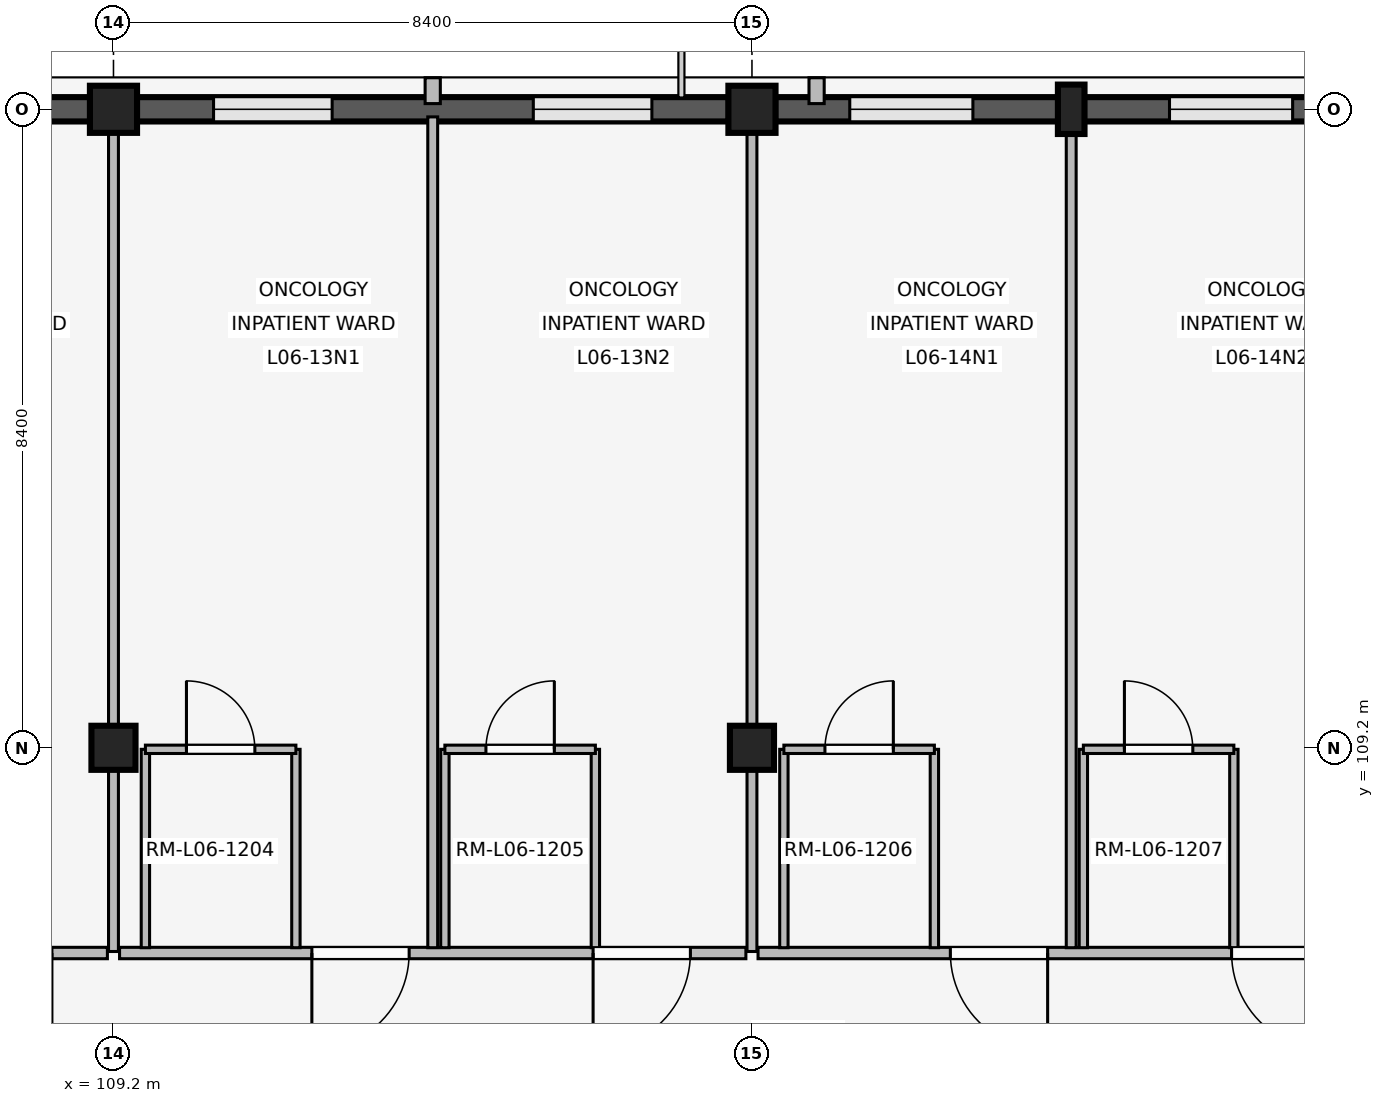
"""IFC4 building model, lengths in metres.
Left out: names, types, materials, properties, quantities, classifications, styles, units other than length and angle.
Written with IfcOpenShell. Run it as: python <this file> out.ifc"""

import sys

from ifc_helpers import new_model, si_unit, direction, frame, frame_2d, origin, origin_2d, place, context, subcontext, project, spatial, rectangle, extrude, element, fill, save


model = new_model("IFC4")
c1 = context("Model", 3, precision=1e-05, world=origin(), true_north=direction((0.0, 1.0)))
c2 = subcontext(c1, "Body", "Model", "MODEL_VIEW")
j1 = project(units=[si_unit("LENGTHUNIT", "METRE"), si_unit("PLANEANGLEUNIT", "RADIAN")], contexts=[c1])
p1 = place(None, origin())
s1 = spatial("IfcSite", under=j1, at=p1, CompositionType="ELEMENT")
p2 = place(p1, origin())
s2 = spatial("IfcBuilding", under=s1, at=p2, CompositionType="ELEMENT")
p3 = place(p2, frame((0.0, 0.0, 24.6)))
s3 = spatial("IfcBuildingStorey", under=s2, at=p3, CompositionType="ELEMENT", Elevation=24.6)
p4 = place(p3, frame((109.2, 109.2, 0.0), z_axis=(0.0, 0.0, 1.0), x_axis=(1.0, 0.0, 0.0)))
e1 = element("IfcColumn", 1, at=p4, inside=s3, PredefinedType="COLUMN", context=c2, shape_type="SweptSolid", body=[
    extrude(rectangle(XDim=0.58, YDim=0.58, at=origin_2d()), origin(), (0.0, 0.0, 1.0), 4.2),
])
p5 = place(p3, frame((109.2, 117.6, 0.0), z_axis=(0.0, 0.0, 1.0), x_axis=(1.0, 0.0, 0.0)))
e2 = element("IfcColumn", 2, at=p5, inside=s3, PredefinedType="COLUMN", context=c2, shape_type="SweptSolid", body=[
    extrude(rectangle(XDim=0.62, YDim=0.62, at=origin_2d()), origin(), (0.0, 0.0, 1.0), 4.2),
])
p6 = place(p3, frame((117.6, 109.2, 0.0), z_axis=(0.0, 0.0, 1.0), x_axis=(1.0, 0.0, 0.0)))
e3 = element("IfcColumn", 3, at=p6, inside=s3, PredefinedType="COLUMN", context=c2, shape_type="SweptSolid", body=[
    extrude(rectangle(XDim=0.58, YDim=0.58, at=origin_2d()), origin(), (0.0, 0.0, 1.0), 4.2),
])
p7 = place(p3, frame((117.6, 117.6, 0.0), z_axis=(0.0, 0.0, 1.0), x_axis=(1.0, 0.0, 0.0)))
e4 = element("IfcColumn", 4, at=p7, inside=s3, PredefinedType="COLUMN", context=c2, shape_type="SweptSolid", body=[
    extrude(rectangle(XDim=0.62, YDim=0.62, at=origin_2d()), origin(), (0.0, 0.0, 1.0), 4.2),
])
p8 = place(p3, frame((121.8, 117.6, 0.0), z_axis=(0.0, 0.0, 1.0), x_axis=(1.0, 0.0, 0.0)))
e5 = element("IfcColumn", 5, at=p8, inside=s3, PredefinedType="PILASTER", context=c2, shape_type="SweptSolid", body=[
    extrude(rectangle(XDim=0.35, YDim=0.65, at=origin_2d()), origin(), (0.0, 0.0, 1.0), 4.2),
])
p9 = place(p3, frame((101.105, 117.6, 0.0), z_axis=(0.0, 0.0, 1.0), x_axis=(1.0, 0.0, 0.0)))
e6 = element("IfcWall", 6, at=p9, inside=s3, PredefinedType="SOLIDWALL", context=c2, shape_type="SweptSolid", body=[
    extrude(rectangle(XDim=7.79, YDim=0.32, at=frame_2d((3.895, 0.0))), origin(), (0.0, 0.0, 1.0), 3.34),
])
p10 = place(p9, frame((1.102, 0.0, 0.85)))
e7 = element("IfcOpeningElement", 7, at=p10, cuts=e6, PredefinedType="OPENING", context=c2, shape_type="SweptSolid", body=[
    extrude(rectangle(XDim=1.38, YDim=1.5, at=frame_2d((0.69, 0.75))), frame((0.0, 0.17, 0.0), z_axis=(0.0, -1.0, 0.0), x_axis=(1.0, 0.0, 0.0)), (0.0, 0.0, 1.0), 0.34),
])
p11 = place(p9, frame((5.308, 0.0, 0.85)))
e8 = element("IfcOpeningElement", 8, at=p11, cuts=e6, PredefinedType="OPENING", context=c2, shape_type="SweptSolid", body=[
    extrude(rectangle(XDim=1.38, YDim=1.5, at=frame_2d((0.69, 0.75))), frame((0.0, 0.17, 0.0), z_axis=(0.0, -1.0, 0.0), x_axis=(1.0, 0.0, 0.0)), (0.0, 0.0, 1.0), 0.34),
])
p12 = place(p3, frame((109.505, 117.6, 0.0), z_axis=(0.0, 0.0, 1.0), x_axis=(1.0, 0.0, 0.0)))
e9 = element("IfcWall", 9, at=p12, inside=s3, PredefinedType="SOLIDWALL", context=c2, shape_type="SweptSolid", body=[
    extrude(rectangle(XDim=7.79, YDim=0.32, at=frame_2d((3.895, 0.0))), origin(), (0.0, 0.0, 1.0), 3.34),
])
p13 = place(p12, frame((1.012, 0.0, 0.85)))
e10 = element("IfcOpeningElement", 10, at=p13, cuts=e9, PredefinedType="OPENING", context=c2, shape_type="SweptSolid", body=[
    extrude(rectangle(XDim=1.56, YDim=1.7, at=frame_2d((0.78, 0.85))), frame((0.0, 0.17, 0.0), z_axis=(0.0, -1.0, 0.0), x_axis=(1.0, 0.0, 0.0)), (0.0, 0.0, 1.0), 0.34),
])
p14 = place(p12, frame((5.218, 0.0, 0.85)))
e11 = element("IfcOpeningElement", 11, at=p14, cuts=e9, PredefinedType="OPENING", context=c2, shape_type="SweptSolid", body=[
    extrude(rectangle(XDim=1.56, YDim=1.7, at=frame_2d((0.78, 0.85))), frame((0.0, 0.17, 0.0), z_axis=(0.0, -1.0, 0.0), x_axis=(1.0, 0.0, 0.0)), (0.0, 0.0, 1.0), 0.34),
])
p15 = place(p3, frame((113.4, 117.675, 0.0), z_axis=(0.0, 0.0, 1.0), x_axis=(0.0, 1.0, 0.0)))
e12 = element("IfcWall", 12, at=p15, inside=s3, PredefinedType="ELEMENTEDWALL", context=c2, shape_type="SweptSolid", body=[
    extrude(rectangle(XDim=0.34, YDim=0.2, at=frame_2d((0.17, 0.0))), origin(), (0.0, 0.0, 1.0), 3.32),
])
p16 = place(p3, frame((117.905, 117.6, 0.0), z_axis=(0.0, 0.0, 1.0), x_axis=(1.0, 0.0, 0.0)))
e13 = element("IfcWall", 13, at=p16, inside=s3, PredefinedType="SOLIDWALL", context=c2, shape_type="SweptSolid", body=[
    extrude(rectangle(XDim=7.79, YDim=0.32, at=frame_2d((3.895, 0.0))), origin(), (0.0, 0.0, 1.0), 3.34),
])
p17 = place(p16, frame((0.982, 0.0, 0.85)))
e14 = element("IfcOpeningElement", 14, at=p17, cuts=e13, PredefinedType="OPENING", context=c2, shape_type="SweptSolid", body=[
    extrude(rectangle(XDim=1.62, YDim=1.8, at=frame_2d((0.81, 0.9))), frame((0.0, 0.17, 0.0), z_axis=(0.0, -1.0, 0.0), x_axis=(1.0, 0.0, 0.0)), (0.0, 0.0, 1.0), 0.34),
])
p18 = place(p16, frame((5.188, 0.0, 0.85)))
e15 = element("IfcOpeningElement", 15, at=p18, cuts=e13, PredefinedType="OPENING", context=c2, shape_type="SweptSolid", body=[
    extrude(rectangle(XDim=1.62, YDim=1.8, at=frame_2d((0.81, 0.9))), frame((0.0, 0.17, 0.0), z_axis=(0.0, -1.0, 0.0), x_axis=(1.0, 0.0, 0.0)), (0.0, 0.0, 1.0), 0.34),
])
p19 = place(p3, frame((118.45, 117.675, 0.0), z_axis=(0.0, 0.0, 1.0), x_axis=(0.0, 1.0, 0.0)))
e16 = element("IfcWall", 16, at=p19, inside=s3, PredefinedType="ELEMENTEDWALL", context=c2, shape_type="SweptSolid", body=[
    extrude(rectangle(XDim=0.34, YDim=0.2, at=frame_2d((0.17, 0.0))), origin(), (0.0, 0.0, 1.0), 3.32),
])
p20 = place(p3, frame((109.12, 106.5, 0.0), z_axis=(0.0, 0.0, 1.0), x_axis=(-1.0, 0.0, 0.0)))
e17 = element("IfcWall", 17, at=p20, inside=s3, PredefinedType="PARTITIONING", context=c2, shape_type="SweptSolid", body=[
    extrude(rectangle(XDim=8.24, YDim=0.15, at=frame_2d((4.12, 0.0))), origin(), (0.0, 0.0, 1.0), 3.32),
])
p21 = place(p20, frame((0.73, 0.0, 0.0)))
e18 = element("IfcOpeningElement", 18, at=p21, cuts=e17, PredefinedType="OPENING", context=c2, shape_type="SweptSolid", body=[
    extrude(rectangle(XDim=1.28, YDim=2.2, at=frame_2d((0.64, 1.1))), frame((0.0, 0.085, 0.0), z_axis=(0.0, -1.0, 0.0), x_axis=(1.0, 0.0, 0.0)), (0.0, 0.0, 1.0), 0.17),
])
p22 = place(p20, frame((4.43, 0.0, 0.0)))
e19 = element("IfcOpeningElement", 19, at=p22, cuts=e17, PredefinedType="OPENING", context=c2, shape_type="SweptSolid", body=[
    extrude(rectangle(XDim=1.28, YDim=2.2, at=frame_2d((0.64, 1.1))), frame((0.0, 0.085, 0.0), z_axis=(0.0, -1.0, 0.0), x_axis=(1.0, 0.0, 0.0)), (0.0, 0.0, 1.0), 0.17),
])
p23 = place(p3, frame((109.2, 106.52, 0.0), z_axis=(0.0, 0.0, 1.0), x_axis=(0.0, 1.0, 0.0)))
e20 = element("IfcWall", 20, at=p23, inside=s3, PredefinedType="PARTITIONING", context=c2, shape_type="SweptSolid", body=[
    extrude(rectangle(XDim=10.94, YDim=0.13, at=frame_2d((5.47, 0.0))), origin(), (0.0, 0.0, 1.0), 3.32),
])
p24 = place(p3, frame((117.52, 106.5, 0.0), z_axis=(0.0, 0.0, 1.0), x_axis=(-1.0, 0.0, 0.0)))
e21 = element("IfcWall", 21, at=p24, inside=s3, PredefinedType="PARTITIONING", context=c2, shape_type="SweptSolid", body=[
    extrude(rectangle(XDim=8.24, YDim=0.15, at=frame_2d((4.12, 0.0))), origin(), (0.0, 0.0, 1.0), 3.32),
])
p25 = place(p24, frame((0.73, 0.0, 0.0)))
e22 = element("IfcOpeningElement", 22, at=p25, cuts=e21, PredefinedType="OPENING", context=c2, shape_type="SweptSolid", body=[
    extrude(rectangle(XDim=1.28, YDim=2.2, at=frame_2d((0.64, 1.1))), frame((0.0, 0.085, 0.0), z_axis=(0.0, -1.0, 0.0), x_axis=(1.0, 0.0, 0.0)), (0.0, 0.0, 1.0), 0.17),
])
p26 = place(p24, frame((4.43, 0.0, 0.0)))
e23 = element("IfcOpeningElement", 23, at=p26, cuts=e21, PredefinedType="OPENING", context=c2, shape_type="SweptSolid", body=[
    extrude(rectangle(XDim=1.28, YDim=2.2, at=frame_2d((0.64, 1.1))), frame((0.0, 0.085, 0.0), z_axis=(0.0, -1.0, 0.0), x_axis=(1.0, 0.0, 0.0)), (0.0, 0.0, 1.0), 0.17),
])
p27 = place(p3, frame((113.4, 106.57, 0.0), z_axis=(0.0, 0.0, 1.0), x_axis=(0.0, 1.0, 0.0)))
e24 = element("IfcWall", 24, at=p27, inside=s3, PredefinedType="PARTITIONING", context=c2, shape_type="SweptSolid", body=[
    extrude(rectangle(XDim=10.93, YDim=0.13, at=frame_2d((5.465, 0.0))), origin(), (0.0, 0.0, 1.0), 3.32),
])
for number, where, z_axis, x_axis in (
    (25, (109.62, 106.57, 0.0), (0.0, 0.0, 1.0), (0.0, 1.0, 0.0)),
    (26, (111.6, 106.57, 0.0), (0.0, 0.0, 1.0), (0.0, 1.0, 0.0)),
):
    element("IfcWall", number, at=place(p3, frame(where, z_axis=z_axis, x_axis=x_axis)), inside=s3, PredefinedType="PARTITIONING", context=c2, shape_type="SweptSolid", body=[
        extrude(rectangle(XDim=2.61, YDim=0.11, at=frame_2d((1.305, 0.0))), origin(), (0.0, 0.0, 1.0), 3.32),
    ])
p28 = place(p3, frame((109.62, 109.18, 0.0), z_axis=(0.0, 0.0, 1.0), x_axis=(1.0, 0.0, 0.0)))
e27 = element("IfcWall", 27, at=p28, inside=s3, PredefinedType="PARTITIONING", context=c2, shape_type="SweptSolid", body=[
    extrude(rectangle(XDim=1.98, YDim=0.11, at=frame_2d((0.99, 0.0))), origin(), (0.0, 0.0, 1.0), 3.32),
])
p29 = place(p28, frame((0.54, 0.0, 0.0)))
e28 = element("IfcOpeningElement", 28, at=p29, cuts=e27, PredefinedType="OPENING", context=c2, shape_type="SweptSolid", body=[
    extrude(rectangle(XDim=0.9, YDim=2.1, at=frame_2d((0.45, 1.05))), frame((0.0, 0.065, 0.0), z_axis=(0.0, -1.0, 0.0), x_axis=(1.0, 0.0, 0.0)), (0.0, 0.0, 1.0), 0.13),
])
for number, where, z_axis, x_axis in (
    (29, (113.56, 106.57, 0.0), (0.0, 0.0, 1.0), (0.0, 1.0, 0.0)),
    (30, (115.54, 106.57, 0.0), (0.0, 0.0, 1.0), (0.0, 1.0, 0.0)),
):
    element("IfcWall", number, at=place(p3, frame(where, z_axis=z_axis, x_axis=x_axis)), inside=s3, PredefinedType="PARTITIONING", context=c2, shape_type="SweptSolid", body=[
        extrude(rectangle(XDim=2.61, YDim=0.11, at=frame_2d((1.305, 0.0))), origin(), (0.0, 0.0, 1.0), 3.32),
    ])
p30 = place(p3, frame((113.56, 109.18, 0.0), z_axis=(0.0, 0.0, 1.0), x_axis=(1.0, 0.0, 0.0)))
e31 = element("IfcWall", 31, at=p30, inside=s3, PredefinedType="PARTITIONING", context=c2, shape_type="SweptSolid", body=[
    extrude(rectangle(XDim=1.98, YDim=0.11, at=frame_2d((0.99, 0.0))), origin(), (0.0, 0.0, 1.0), 3.32),
])
p31 = place(p30, frame((0.54, 0.0, 0.0)))
e32 = element("IfcOpeningElement", 32, at=p31, cuts=e31, PredefinedType="OPENING", context=c2, shape_type="SweptSolid", body=[
    extrude(rectangle(XDim=0.9, YDim=2.1, at=frame_2d((0.45, 1.05))), frame((0.0, 0.065, 0.0), z_axis=(0.0, -1.0, 0.0), x_axis=(1.0, 0.0, 0.0)), (0.0, 0.0, 1.0), 0.13),
])
p32 = place(p3, frame((117.6, 106.52, 0.0), z_axis=(0.0, 0.0, 1.0), x_axis=(0.0, 1.0, 0.0)))
e33 = element("IfcWall", 33, at=p32, inside=s3, PredefinedType="PARTITIONING", context=c2, shape_type="SweptSolid", body=[
    extrude(rectangle(XDim=10.94, YDim=0.13, at=frame_2d((5.47, 0.0))), origin(), (0.0, 0.0, 1.0), 3.32),
])
p33 = place(p3, frame((125.92, 106.5, 0.0), z_axis=(0.0, 0.0, 1.0), x_axis=(-1.0, 0.0, 0.0)))
e34 = element("IfcWall", 34, at=p33, inside=s3, PredefinedType="PARTITIONING", context=c2, shape_type="SweptSolid", body=[
    extrude(rectangle(XDim=8.24, YDim=0.15, at=frame_2d((4.12, 0.0))), origin(), (0.0, 0.0, 1.0), 3.32),
])
p34 = place(p33, frame((0.73, 0.0, 0.0)))
e35 = element("IfcOpeningElement", 35, at=p34, cuts=e34, PredefinedType="OPENING", context=c2, shape_type="SweptSolid", body=[
    extrude(rectangle(XDim=1.28, YDim=2.2, at=frame_2d((0.64, 1.1))), frame((0.0, 0.085, 0.0), z_axis=(0.0, -1.0, 0.0), x_axis=(1.0, 0.0, 0.0)), (0.0, 0.0, 1.0), 0.17),
])
p35 = place(p33, frame((4.43, 0.0, 0.0)))
e36 = element("IfcOpeningElement", 36, at=p35, cuts=e34, PredefinedType="OPENING", context=c2, shape_type="SweptSolid", body=[
    extrude(rectangle(XDim=1.28, YDim=2.2, at=frame_2d((0.64, 1.1))), frame((0.0, 0.085, 0.0), z_axis=(0.0, -1.0, 0.0), x_axis=(1.0, 0.0, 0.0)), (0.0, 0.0, 1.0), 0.17),
])
p36 = place(p3, frame((121.8, 106.57, 0.0), z_axis=(0.0, 0.0, 1.0), x_axis=(0.0, 1.0, 0.0)))
e37 = element("IfcWall", 37, at=p36, inside=s3, PredefinedType="PARTITIONING", context=c2, shape_type="SweptSolid", body=[
    extrude(rectangle(XDim=10.93, YDim=0.13, at=frame_2d((5.465, 0.0))), origin(), (0.0, 0.0, 1.0), 3.32),
])
for number, where, z_axis, x_axis in (
    (38, (118.02, 106.57, 0.0), (0.0, 0.0, 1.0), (0.0, 1.0, 0.0)),
    (39, (120.0, 106.57, 0.0), (0.0, 0.0, 1.0), (0.0, 1.0, 0.0)),
):
    element("IfcWall", number, at=place(p3, frame(where, z_axis=z_axis, x_axis=x_axis)), inside=s3, PredefinedType="PARTITIONING", context=c2, shape_type="SweptSolid", body=[
        extrude(rectangle(XDim=2.61, YDim=0.11, at=frame_2d((1.305, 0.0))), origin(), (0.0, 0.0, 1.0), 3.32),
    ])
p37 = place(p3, frame((118.02, 109.18, 0.0), z_axis=(0.0, 0.0, 1.0), x_axis=(1.0, 0.0, 0.0)))
e40 = element("IfcWall", 40, at=p37, inside=s3, PredefinedType="PARTITIONING", context=c2, shape_type="SweptSolid", body=[
    extrude(rectangle(XDim=1.98, YDim=0.11, at=frame_2d((0.99, 0.0))), origin(), (0.0, 0.0, 1.0), 3.32),
])
p38 = place(p37, frame((0.54, 0.0, 0.0)))
e41 = element("IfcOpeningElement", 41, at=p38, cuts=e40, PredefinedType="OPENING", context=c2, shape_type="SweptSolid", body=[
    extrude(rectangle(XDim=0.9, YDim=2.1, at=frame_2d((0.45, 1.05))), frame((0.0, 0.065, 0.0), z_axis=(0.0, -1.0, 0.0), x_axis=(1.0, 0.0, 0.0)), (0.0, 0.0, 1.0), 0.13),
])
for number, where, z_axis, x_axis in (
    (42, (121.96, 106.57, 0.0), (0.0, 0.0, 1.0), (0.0, 1.0, 0.0)),
    (43, (123.94, 106.57, 0.0), (0.0, 0.0, 1.0), (0.0, 1.0, 0.0)),
):
    element("IfcWall", number, at=place(p3, frame(where, z_axis=z_axis, x_axis=x_axis)), inside=s3, PredefinedType="PARTITIONING", context=c2, shape_type="SweptSolid", body=[
        extrude(rectangle(XDim=2.61, YDim=0.11, at=frame_2d((1.305, 0.0))), origin(), (0.0, 0.0, 1.0), 3.32),
    ])
p39 = place(p3, frame((121.96, 109.18, 0.0), z_axis=(0.0, 0.0, 1.0), x_axis=(1.0, 0.0, 0.0)))
e44 = element("IfcWall", 44, at=p39, inside=s3, PredefinedType="PARTITIONING", context=c2, shape_type="SweptSolid", body=[
    extrude(rectangle(XDim=1.98, YDim=0.11, at=frame_2d((0.99, 0.0))), origin(), (0.0, 0.0, 1.0), 3.32),
])
p40 = place(p39, frame((0.54, 0.0, 0.0)))
e45 = element("IfcOpeningElement", 45, at=p40, cuts=e44, PredefinedType="OPENING", context=c2, shape_type="SweptSolid", body=[
    extrude(rectangle(XDim=0.9, YDim=2.1, at=frame_2d((0.45, 1.05))), frame((0.0, 0.065, 0.0), z_axis=(0.0, -1.0, 0.0), x_axis=(1.0, 0.0, 0.0)), (0.0, 0.0, 1.0), 0.13),
])
p41 = place(p13, origin())
e46 = element("IfcWindow", 46, at=p41, inside=s3, PartitioningType="SINGLE_PANEL", PredefinedType="WINDOW", context=c2, shape_type="SweptSolid", body=[
    extrude(rectangle(XDim=1.56, YDim=1.7, at=frame_2d((0.78, 0.85))), frame((0.0, 0.03, 0.0), z_axis=(0.0, -1.0, 0.0), x_axis=(1.0, 0.0, 0.0)), (0.0, 0.0, 1.0), 0.06),
])
fill(e10, e46)
p42 = place(p14, origin())
e47 = element("IfcWindow", 47, at=p42, inside=s3, PartitioningType="SINGLE_PANEL", PredefinedType="WINDOW", context=c2, shape_type="SweptSolid", body=[
    extrude(rectangle(XDim=1.56, YDim=1.7, at=frame_2d((0.78, 0.85))), frame((0.0, 0.03, 0.0), z_axis=(0.0, -1.0, 0.0), x_axis=(1.0, 0.0, 0.0)), (0.0, 0.0, 1.0), 0.06),
])
fill(e11, e47)
p43 = place(p17, origin())
e48 = element("IfcWindow", 48, at=p43, inside=s3, PartitioningType="SINGLE_PANEL", PredefinedType="WINDOW", context=c2, shape_type="SweptSolid", body=[
    extrude(rectangle(XDim=1.62, YDim=1.8, at=frame_2d((0.81, 0.9))), frame((0.0, 0.03, 0.0), z_axis=(0.0, -1.0, 0.0), x_axis=(1.0, 0.0, 0.0)), (0.0, 0.0, 1.0), 0.06),
])
fill(e14, e48)
p44 = place(p18, origin())
e49 = element("IfcWindow", 49, at=p44, inside=s3, PartitioningType="SINGLE_PANEL", PredefinedType="WINDOW", context=c2, shape_type="SweptSolid", body=[
    extrude(rectangle(XDim=1.62, YDim=1.8, at=frame_2d((0.81, 0.9))), frame((0.0, 0.03, 0.0), z_axis=(0.0, -1.0, 0.0), x_axis=(1.0, 0.0, 0.0)), (0.0, 0.0, 1.0), 0.06),
])
fill(e15, e49)
p45 = place(p25, origin())
e50 = element("IfcDoor", 50, at=p45, inside=s3, OperationType="SINGLE_SWING_RIGHT", PredefinedType="DOOR", context=c2, shape_type="SweptSolid", body=[
    extrude(rectangle(XDim=1.28, YDim=2.2, at=frame_2d((0.64, 1.1))), frame((0.0, 0.025, 0.0), z_axis=(0.0, -1.0, 0.0), x_axis=(1.0, 0.0, 0.0)), (0.0, 0.0, 1.0), 0.05),
])
fill(e22, e50)
p46 = place(p26, origin())
e51 = element("IfcDoor", 51, at=p46, inside=s3, OperationType="SINGLE_SWING_RIGHT", PredefinedType="DOOR", context=c2, shape_type="SweptSolid", body=[
    extrude(rectangle(XDim=1.28, YDim=2.2, at=frame_2d((0.64, 1.1))), frame((0.0, 0.025, 0.0), z_axis=(0.0, -1.0, 0.0), x_axis=(1.0, 0.0, 0.0)), (0.0, 0.0, 1.0), 0.05),
])
fill(e23, e51)
p47 = place(p29, origin())
e52 = element("IfcDoor", 52, at=p47, inside=s3, OperationType="SINGLE_SWING_LEFT", PredefinedType="DOOR", context=c2, shape_type="SweptSolid", body=[
    extrude(rectangle(XDim=0.9, YDim=2.1, at=frame_2d((0.45, 1.05))), frame((0.0, 0.025, 0.0), z_axis=(0.0, -1.0, 0.0), x_axis=(1.0, 0.0, 0.0)), (0.0, 0.0, 1.0), 0.05),
])
fill(e28, e52)
p48 = place(p31, origin())
e53 = element("IfcDoor", 53, at=p48, inside=s3, OperationType="SINGLE_SWING_RIGHT", PredefinedType="DOOR", context=c2, shape_type="SweptSolid", body=[
    extrude(rectangle(XDim=0.9, YDim=2.1, at=frame_2d((0.45, 1.05))), frame((0.0, 0.025, 0.0), z_axis=(0.0, -1.0, 0.0), x_axis=(1.0, 0.0, 0.0)), (0.0, 0.0, 1.0), 0.05),
])
fill(e32, e53)
p49 = place(p34, origin())
e54 = element("IfcDoor", 54, at=p49, inside=s3, OperationType="SINGLE_SWING_LEFT", PredefinedType="DOOR", context=c2, shape_type="SweptSolid", body=[
    extrude(rectangle(XDim=1.28, YDim=2.2, at=frame_2d((0.64, 1.1))), frame((0.0, 0.025, 0.0), z_axis=(0.0, -1.0, 0.0), x_axis=(1.0, 0.0, 0.0)), (0.0, 0.0, 1.0), 0.05),
])
fill(e35, e54)
p50 = place(p35, origin())
e55 = element("IfcDoor", 55, at=p50, inside=s3, OperationType="SINGLE_SWING_LEFT", PredefinedType="DOOR", context=c2, shape_type="SweptSolid", body=[
    extrude(rectangle(XDim=1.28, YDim=2.2, at=frame_2d((0.64, 1.1))), frame((0.0, 0.025, 0.0), z_axis=(0.0, -1.0, 0.0), x_axis=(1.0, 0.0, 0.0)), (0.0, 0.0, 1.0), 0.05),
])
fill(e36, e55)
p51 = place(p38, origin())
e56 = element("IfcDoor", 56, at=p51, inside=s3, OperationType="SINGLE_SWING_RIGHT", PredefinedType="DOOR", context=c2, shape_type="SweptSolid", body=[
    extrude(rectangle(XDim=0.9, YDim=2.1, at=frame_2d((0.45, 1.05))), frame((0.0, 0.025, 0.0), z_axis=(0.0, -1.0, 0.0), x_axis=(1.0, 0.0, 0.0)), (0.0, 0.0, 1.0), 0.05),
])
fill(e41, e56)
p52 = place(p40, origin())
e57 = element("IfcDoor", 57, at=p52, inside=s3, OperationType="SINGLE_SWING_LEFT", PredefinedType="DOOR", context=c2, shape_type="SweptSolid", body=[
    extrude(rectangle(XDim=0.9, YDim=2.1, at=frame_2d((0.45, 1.05))), frame((0.0, 0.025, 0.0), z_axis=(0.0, -1.0, 0.0), x_axis=(1.0, 0.0, 0.0)), (0.0, 0.0, 1.0), 0.05),
])
fill(e45, e57)
save(model, sys.argv[1])
